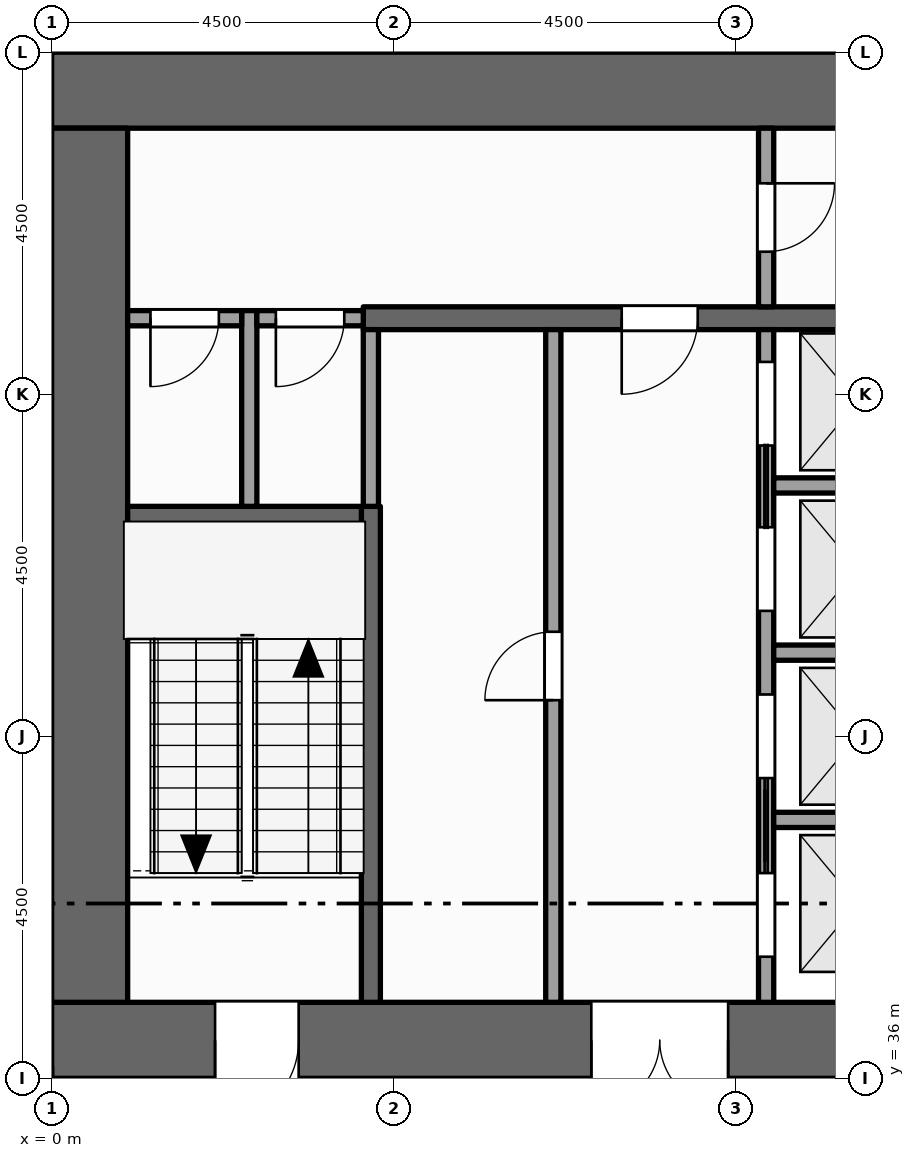
"""IFC4 building model, lengths in metres.
Left out: names, types, materials, properties, quantities, classifications, styles, units other than length and angle.
Written with IfcOpenShell. Run it as: python <this file> out.ifc"""

import sys

from ifc_helpers import new_model, si_unit, direction, frame, frame_2d, origin, place, context, subcontext, project, spatial, rectangle, extrude, element, fill, save


model = new_model("IFC4")
c1 = context("Model", 3, precision=1e-05, world=origin(), true_north=direction((0.0, 1.0)))
c2 = subcontext(c1, "Body", "Model", "MODEL_VIEW")
j1 = project(units=[si_unit("LENGTHUNIT", "METRE"), si_unit("PLANEANGLEUNIT", "RADIAN")], contexts=[c1])
p1 = place(None, origin())
s1 = spatial("IfcSite", under=j1, at=p1, CompositionType="ELEMENT")
p2 = place(p1, origin())
s2 = spatial("IfcBuilding", under=s1, at=p2, CompositionType="ELEMENT")
p3 = place(p2, frame((0.0, 0.0, 179.0)))
s3 = spatial("IfcBuildingStorey", under=s2, at=p3, CompositionType="ELEMENT", Elevation=179.0)
p4 = place(p3, frame((0.0, 36.5, -0.15), z_axis=(0.0, 0.0, 1.0), x_axis=(1.0, 0.0, 0.0)))
e1 = element("IfcWall", 1, at=p4, inside=s3, PredefinedType="SHEAR", context=c2, shape_type="SweptSolid", body=[
    extrude(rectangle(XDim=22.5, YDim=1.0, at=frame_2d((11.25, 0.0))), origin(), (0.0, 0.0, 1.0), 4.0),
])
p5 = place(p4, frame((7.1, 0.0, 0.15)))
e2 = element("IfcOpeningElement", 2, at=p5, cuts=e1, PredefinedType="OPENING", context=c2, shape_type="SweptSolid", body=[
    extrude(rectangle(XDim=1.8, YDim=2.1, at=frame_2d((0.9, 1.05))), frame((0.0, 0.51, 0.0), z_axis=(0.0, -1.0, 0.0), x_axis=(1.0, 0.0, 0.0)), (0.0, 0.0, 1.0), 1.02),
])
p6 = place(p4, frame((13.15, 0.0, 0.15)))
e3 = element("IfcOpeningElement", 3, at=p6, cuts=e1, PredefinedType="OPENING", context=c2, shape_type="SweptSolid", body=[
    extrude(rectangle(XDim=1.1, YDim=2.1, at=frame_2d((0.55, 1.05))), frame((0.0, 0.51, 0.0), z_axis=(0.0, -1.0, 0.0), x_axis=(1.0, 0.0, 0.0)), (0.0, 0.0, 1.0), 1.02),
])
p7 = place(p4, frame((2.15, 0.0, 0.15)))
e4 = element("IfcOpeningElement", 4, at=p7, cuts=e1, PredefinedType="OPENING", context=c2, shape_type="SweptSolid", body=[
    extrude(rectangle(XDim=1.1, YDim=2.1, at=frame_2d((0.55, 1.05))), frame((0.0, 0.51, 0.0), z_axis=(0.0, -1.0, 0.0), x_axis=(1.0, 0.0, 0.0)), (0.0, 0.0, 1.0), 1.02),
])
p8 = place(p4, frame((19.35, 0.0, 0.15)))
e5 = element("IfcOpeningElement", 5, at=p8, cuts=e1, PredefinedType="OPENING", context=c2, shape_type="SweptSolid", body=[
    extrude(rectangle(XDim=1.1, YDim=2.1, at=frame_2d((0.55, 1.05))), frame((0.0, 0.51, 0.0), z_axis=(0.0, -1.0, 0.0), x_axis=(1.0, 0.0, 0.0)), (0.0, 0.0, 1.0), 1.02),
])
p9 = place(p3, frame((0.0, 49.0, -0.15), z_axis=(0.0, 0.0, 1.0), x_axis=(1.0, 0.0, 0.0)))
e6 = element("IfcWall", 6, at=p9, inside=s3, PredefinedType="SHEAR", context=c2, shape_type="SweptSolid", body=[
    extrude(rectangle(XDim=22.5, YDim=1.0, at=frame_2d((11.25, 0.0))), origin(), (0.0, 0.0, 1.0), 4.0),
])
p10 = place(p3, frame((0.5, 37.0, -0.15), z_axis=(0.0, 0.0, 1.0), x_axis=(0.0, 1.0, 0.0)))
e7 = element("IfcWall", 7, at=p10, inside=s3, PredefinedType="SHEAR", context=c2, shape_type="SweptSolid", body=[
    extrude(rectangle(XDim=11.5, YDim=1.0, at=frame_2d((5.75, 0.0))), origin(), (0.0, 0.0, 1.0), 4.0),
])
p11 = place(p3, frame((0.0, 36.0, 0.0), z_axis=(0.0, 0.0, 1.0), x_axis=(-1.0, 0.0, 0.0)))
e8 = element("IfcWall", 8, at=p11, inside=s3, PredefinedType="STANDARD", context=c2, shape_type="SweptSolid", body=[
    extrude(rectangle(XDim=1.05, YDim=0.3, at=frame_2d((0.525, 0.0))), origin(), (0.0, 0.0, 1.0), 2.87),
])
p12 = place(p3, frame((2.6, 43.525, 0.0), z_axis=(0.0, 0.0, 1.0), x_axis=(0.0, 1.0, 0.0)))
e9 = element("IfcWall", 9, at=p12, inside=s3, PredefinedType="PARTITIONING", context=c2, shape_type="SweptSolid", body=[
    extrude(rectangle(XDim=2.575, YDim=0.2, at=frame_2d((1.288, 0.0))), origin(), (0.0, 0.0, 1.0), 3.85),
])
p13 = place(p3, frame((4.2, 37.0, 0.0), z_axis=(0.0, 0.0, 1.0), x_axis=(0.0, 1.0, 0.0)))
e10 = element("IfcWall", 10, at=p13, inside=s3, PredefinedType="SHEAR", context=c2, shape_type="SweptSolid", body=[
    extrude(rectangle(XDim=6.525, YDim=0.25, at=frame_2d((3.262, 0.0))), origin(), (0.0, 0.0, 1.0), 3.85),
])
p14 = place(p3, frame((4.2, 43.525, 0.0), z_axis=(0.0, 0.0, 1.0), x_axis=(0.0, 1.0, 0.0)))
e11 = element("IfcWall", 11, at=p14, inside=s3, PredefinedType="PARTITIONING", context=c2, shape_type="SweptSolid", body=[
    extrude(rectangle(XDim=2.325, YDim=0.2, at=frame_2d((1.163, 0.0))), origin(), (0.0, 0.0, 1.0), 3.85),
])
p15 = place(p3, frame((6.6, 37.0, 0.0), z_axis=(0.0, 0.0, 1.0), x_axis=(0.0, 1.0, 0.0)))
e12 = element("IfcWall", 12, at=p15, inside=s3, PredefinedType="PARTITIONING", context=c2, shape_type="SweptSolid", body=[
    extrude(rectangle(XDim=8.85, YDim=0.2, at=frame_2d((4.425, 0.0))), origin(), (0.0, 0.0, 1.0), 3.85),
])
p16 = place(p15, frame((3.975, 0.0, 0.0)))
e13 = element("IfcOpeningElement", 13, at=p16, cuts=e12, PredefinedType="OPENING", context=c2, shape_type="SweptSolid", body=[
    extrude(rectangle(XDim=0.9, YDim=2.1, at=frame_2d((0.45, 1.05))), frame((0.0, 0.11, 0.0), z_axis=(0.0, -1.0, 0.0), x_axis=(1.0, 0.0, 0.0)), (0.0, 0.0, 1.0), 0.22),
])
p17 = place(p3, frame((9.4, 37.0, 0.0), z_axis=(0.0, 0.0, 1.0), x_axis=(0.0, 1.0, 0.0)))
e14 = element("IfcWall", 14, at=p17, inside=s3, PredefinedType="SOLIDWALL", context=c2, shape_type="SweptSolid", body=[
    extrude(rectangle(XDim=8.85, YDim=0.2, at=frame_2d((4.425, 0.0))), origin(), (0.0, 0.0, 1.0), 3.85),
])
p18 = place(p17, frame((0.6, 0.0, 0.012)))
e15 = element("IfcOpeningElement", 15, at=p18, cuts=e14, PredefinedType="OPENING", context=c2, shape_type="SweptSolid", body=[
    extrude(rectangle(XDim=1.1, YDim=2.1, at=frame_2d((0.55, 1.05))), frame((0.0, 0.11, 0.0), z_axis=(0.0, -1.0, 0.0), x_axis=(1.0, 0.0, 0.0)), (0.0, 0.0, 1.0), 0.22),
])
p19 = place(p17, frame((2.95, 0.0, 0.012)))
e16 = element("IfcOpeningElement", 16, at=p19, cuts=e14, PredefinedType="OPENING", context=c2, shape_type="SweptSolid", body=[
    extrude(rectangle(XDim=1.1, YDim=2.1, at=frame_2d((0.55, 1.05))), frame((0.0, 0.11, 0.0), z_axis=(0.0, -1.0, 0.0), x_axis=(1.0, 0.0, 0.0)), (0.0, 0.0, 1.0), 0.22),
])
p20 = place(p17, frame((5.15, 0.0, 0.012)))
e17 = element("IfcOpeningElement", 17, at=p20, cuts=e14, PredefinedType="OPENING", context=c2, shape_type="SweptSolid", body=[
    extrude(rectangle(XDim=1.1, YDim=2.1, at=frame_2d((0.55, 1.05))), frame((0.0, 0.11, 0.0), z_axis=(0.0, -1.0, 0.0), x_axis=(1.0, 0.0, 0.0)), (0.0, 0.0, 1.0), 0.22),
])
p21 = place(p17, frame((7.325, 0.0, 0.012)))
e18 = element("IfcOpeningElement", 18, at=p21, cuts=e14, PredefinedType="OPENING", context=c2, shape_type="SweptSolid", body=[
    extrude(rectangle(XDim=1.1, YDim=2.1, at=frame_2d((0.55, 1.05))), frame((0.0, 0.11, 0.0), z_axis=(0.0, -1.0, 0.0), x_axis=(1.0, 0.0, 0.0)), (0.0, 0.0, 1.0), 0.22),
])
p22 = place(p3, frame((9.4, 46.15, 0.0), z_axis=(0.0, 0.0, 1.0), x_axis=(0.0, 1.0, 0.0)))
e19 = element("IfcWall", 19, at=p22, inside=s3, PredefinedType="PARTITIONING", context=c2, shape_type="SweptSolid", body=[
    extrude(rectangle(XDim=2.35, YDim=0.2, at=frame_2d((1.175, 0.0))), origin(), (0.0, 0.0, 1.0), 3.85),
])
p23 = place(p22, frame((0.725, 0.0, 0.0)))
e20 = element("IfcOpeningElement", 20, at=p23, cuts=e19, PredefinedType="OPENING", context=c2, shape_type="SweptSolid", body=[
    extrude(rectangle(XDim=0.9, YDim=2.1, at=frame_2d((0.45, 1.05))), frame((0.0, 0.11, 0.0), z_axis=(0.0, -1.0, 0.0), x_axis=(1.0, 0.0, 0.0)), (0.0, 0.0, 1.0), 0.22),
])
for number, where, z_axis, x_axis in (
    (21, (9.5, 39.4, 0.0), (0.0, 0.0, 1.0), (1.0, 0.0, 0.0)),
    (22, (9.5, 41.6, 0.0), (0.0, 0.0, 1.0), (1.0, 0.0, 0.0)),
):
    element("IfcWall", number, at=place(p3, frame(where, z_axis=z_axis, x_axis=x_axis)), inside=s3, PredefinedType="SOLIDWALL", context=c2, shape_type="SweptSolid", body=[
        extrude(rectangle(XDim=2.2, YDim=0.2, at=frame_2d((1.1, 0.0))), origin(), (0.0, 0.0, 1.0), 3.85),
    ])
p24 = place(p3, frame((1.0, 43.4, 0.0), z_axis=(0.0, 0.0, 1.0), x_axis=(1.0, 0.0, 0.0)))
e23 = element("IfcWall", 23, at=p24, inside=s3, PredefinedType="SHEAR", context=c2, shape_type="SweptSolid", body=[
    extrude(rectangle(XDim=3.075, YDim=0.25, at=frame_2d((1.538, 0.0))), origin(), (0.0, 0.0, 1.0), 3.85),
])
p25 = place(p3, frame((9.5, 43.8, 0.0), z_axis=(0.0, 0.0, 1.0), x_axis=(1.0, 0.0, 0.0)))
e24 = element("IfcWall", 24, at=p25, inside=s3, PredefinedType="SOLIDWALL", context=c2, shape_type="SweptSolid", body=[
    extrude(rectangle(XDim=2.2, YDim=0.2, at=frame_2d((1.1, 0.0))), origin(), (0.0, 0.0, 1.0), 3.85),
])
p26 = place(p3, frame((1.0, 46.0, 0.0), z_axis=(0.0, 0.0, 1.0), x_axis=(1.0, 0.0, 0.0)))
e25 = element("IfcWall", 25, at=p26, inside=s3, PredefinedType="PARTITIONING", context=c2, shape_type="SweptSolid", body=[
    extrude(rectangle(XDim=1.5, YDim=0.2, at=frame_2d((0.75, 0.0))), origin(), (0.0, 0.0, 1.0), 3.85),
])
p27 = place(p26, frame((0.3, 0.0, 0.0)))
e26 = element("IfcOpeningElement", 26, at=p27, cuts=e25, PredefinedType="OPENING", context=c2, shape_type="SweptSolid", body=[
    extrude(rectangle(XDim=0.9, YDim=2.1, at=frame_2d((0.45, 1.05))), frame((0.0, 0.11, 0.0), z_axis=(0.0, -1.0, 0.0), x_axis=(1.0, 0.0, 0.0)), (0.0, 0.0, 1.0), 0.22),
])
p28 = place(p3, frame((2.7, 46.0, 0.0), z_axis=(0.0, 0.0, 1.0), x_axis=(1.0, 0.0, 0.0)))
e27 = element("IfcWall", 27, at=p28, inside=s3, PredefinedType="PARTITIONING", context=c2, shape_type="SweptSolid", body=[
    extrude(rectangle(XDim=1.4, YDim=0.2, at=frame_2d((0.7, 0.0))), origin(), (0.0, 0.0, 1.0), 3.85),
])
p29 = place(p28, frame((0.25, 0.0, 0.0)))
e28 = element("IfcOpeningElement", 28, at=p29, cuts=e27, PredefinedType="OPENING", context=c2, shape_type="SweptSolid", body=[
    extrude(rectangle(XDim=0.9, YDim=2.1, at=frame_2d((0.45, 1.05))), frame((0.0, 0.11, 0.0), z_axis=(0.0, -1.0, 0.0), x_axis=(1.0, 0.0, 0.0)), (0.0, 0.0, 1.0), 0.22),
])
p30 = place(p3, frame((4.1, 46.0, 0.0), z_axis=(0.0, 0.0, 1.0), x_axis=(1.0, 0.0, 0.0)))
e29 = element("IfcWall", 29, at=p30, inside=s3, PredefinedType="SHEAR", context=c2, shape_type="SweptSolid", body=[
    extrude(rectangle(XDim=14.5, YDim=0.3, at=frame_2d((7.25, 0.0))), origin(), (0.0, 0.0, 1.0), 3.85),
])
p31 = place(p30, frame((3.4, 0.0, 0.0)))
e30 = element("IfcOpeningElement", 30, at=p31, cuts=e29, PredefinedType="OPENING", context=c2, shape_type="SweptSolid", body=[
    extrude(rectangle(XDim=1.0, YDim=2.1, at=frame_2d((0.5, 1.05))), frame((0.0, 0.16, 0.0), z_axis=(0.0, -1.0, 0.0), x_axis=(1.0, 0.0, 0.0)), (0.0, 0.0, 1.0), 0.32),
])
p32 = place(p30, frame((9.1, 0.0, 0.0)))
e31 = element("IfcOpeningElement", 31, at=p32, cuts=e29, PredefinedType="OPENING", context=c2, shape_type="SweptSolid", body=[
    extrude(rectangle(XDim=1.0, YDim=2.1, at=frame_2d((0.5, 1.05))), frame((0.0, 0.16, 0.0), z_axis=(0.0, -1.0, 0.0), x_axis=(1.0, 0.0, 0.0)), (0.0, 0.0, 1.0), 0.32),
])
p33 = place(p18, origin())
e32 = element("IfcDoor", 32, at=p33, inside=s3, OperationType="SLIDING_TO_RIGHT", PredefinedType="DOOR", context=c2, shape_type="SweptSolid", body=[
    extrude(rectangle(XDim=1.1, YDim=2.1, at=frame_2d((0.55, 1.05))), frame((0.0, 0.025, 0.0), z_axis=(0.0, -1.0, 0.0), x_axis=(1.0, 0.0, 0.0)), (0.0, 0.0, 1.0), 0.05),
])
fill(e15, e32)
p34 = place(p19, origin())
e33 = element("IfcDoor", 33, at=p34, inside=s3, OperationType="SLIDING_TO_LEFT", PredefinedType="DOOR", context=c2, shape_type="SweptSolid", body=[
    extrude(rectangle(XDim=1.1, YDim=2.1, at=frame_2d((0.55, 1.05))), frame((0.0, 0.025, 0.0), z_axis=(0.0, -1.0, 0.0), x_axis=(1.0, 0.0, 0.0)), (0.0, 0.0, 1.0), 0.05),
])
fill(e16, e33)
p35 = place(p20, origin())
e34 = element("IfcDoor", 34, at=p35, inside=s3, OperationType="SLIDING_TO_RIGHT", PredefinedType="DOOR", context=c2, shape_type="SweptSolid", body=[
    extrude(rectangle(XDim=1.1, YDim=2.1, at=frame_2d((0.55, 1.05))), frame((0.0, 0.025, 0.0), z_axis=(0.0, -1.0, 0.0), x_axis=(1.0, 0.0, 0.0)), (0.0, 0.0, 1.0), 0.05),
])
fill(e17, e34)
p36 = place(p21, origin())
e35 = element("IfcDoor", 35, at=p36, inside=s3, OperationType="SLIDING_TO_LEFT", PredefinedType="DOOR", context=c2, shape_type="SweptSolid", body=[
    extrude(rectangle(XDim=1.1, YDim=2.1, at=frame_2d((0.55, 1.05))), frame((0.0, 0.025, 0.0), z_axis=(0.0, -1.0, 0.0), x_axis=(1.0, 0.0, 0.0)), (0.0, 0.0, 1.0), 0.05),
])
fill(e18, e35)
p37 = place(p5, origin())
e36 = element("IfcDoor", 36, at=p37, inside=s3, OperationType="DOUBLE_DOOR_SINGLE_SWING", PredefinedType="DOOR", context=c2, shape_type="SweptSolid", body=[
    extrude(rectangle(XDim=1.8, YDim=2.1, at=frame_2d((0.9, 1.05))), frame((0.0, 0.025, 0.0), z_axis=(0.0, -1.0, 0.0), x_axis=(1.0, 0.0, 0.0)), (0.0, 0.0, 1.0), 0.05),
])
fill(e2, e36)
p38 = place(p31, origin())
e37 = element("IfcDoor", 37, at=p38, inside=s3, OperationType="SINGLE_SWING_LEFT", PredefinedType="DOOR", context=c2, shape_type="SweptSolid", body=[
    extrude(rectangle(XDim=1.0, YDim=2.1, at=frame_2d((0.5, 1.05))), frame((0.0, 0.025, 0.0), z_axis=(0.0, -1.0, 0.0), x_axis=(1.0, 0.0, 0.0)), (0.0, 0.0, 1.0), 0.05),
])
fill(e30, e37)
p39 = place(p23, origin())
e38 = element("IfcDoor", 38, at=p39, inside=s3, OperationType="SINGLE_SWING_RIGHT", PredefinedType="DOOR", context=c2, shape_type="SweptSolid", body=[
    extrude(rectangle(XDim=0.9, YDim=2.1, at=frame_2d((0.45, 1.05))), frame((0.0, 0.025, 0.0), z_axis=(0.0, -1.0, 0.0), x_axis=(1.0, 0.0, 0.0)), (0.0, 0.0, 1.0), 0.05),
])
fill(e20, e38)
p40 = place(p7, origin())
e39 = element("IfcDoor", 39, at=p40, inside=s3, OperationType="SINGLE_SWING_LEFT", PredefinedType="DOOR", context=c2, shape_type="SweptSolid", body=[
    extrude(rectangle(XDim=1.1, YDim=2.1, at=frame_2d((0.55, 1.05))), frame((0.0, 0.025, 0.0), z_axis=(0.0, -1.0, 0.0), x_axis=(1.0, 0.0, 0.0)), (0.0, 0.0, 1.0), 0.05),
])
fill(e4, e39)
p41 = place(p27, origin())
e40 = element("IfcDoor", 40, at=p41, inside=s3, OperationType="SINGLE_SWING_LEFT", PredefinedType="DOOR", context=c2, shape_type="SweptSolid", body=[
    extrude(rectangle(XDim=0.9, YDim=2.1, at=frame_2d((0.45, 1.05))), frame((0.0, 0.025, 0.0), z_axis=(0.0, -1.0, 0.0), x_axis=(1.0, 0.0, 0.0)), (0.0, 0.0, 1.0), 0.05),
])
fill(e26, e40)
p42 = place(p29, origin())
e41 = element("IfcDoor", 41, at=p42, inside=s3, OperationType="SINGLE_SWING_LEFT", PredefinedType="DOOR", context=c2, shape_type="SweptSolid", body=[
    extrude(rectangle(XDim=0.9, YDim=2.1, at=frame_2d((0.45, 1.05))), frame((0.0, 0.025, 0.0), z_axis=(0.0, -1.0, 0.0), x_axis=(1.0, 0.0, 0.0)), (0.0, 0.0, 1.0), 0.05),
])
fill(e28, e41)
p43 = place(p16, origin())
e42 = element("IfcDoor", 42, at=p43, inside=s3, OperationType="SINGLE_SWING_LEFT", PredefinedType="DOOR", context=c2, shape_type="SweptSolid", body=[
    extrude(rectangle(XDim=0.9, YDim=2.1, at=frame_2d((0.45, 1.05))), frame((0.0, 0.025, 0.0), z_axis=(0.0, -1.0, 0.0), x_axis=(1.0, 0.0, 0.0)), (0.0, 0.0, 1.0), 0.05),
])
fill(e13, e42)
save(model, sys.argv[1])
